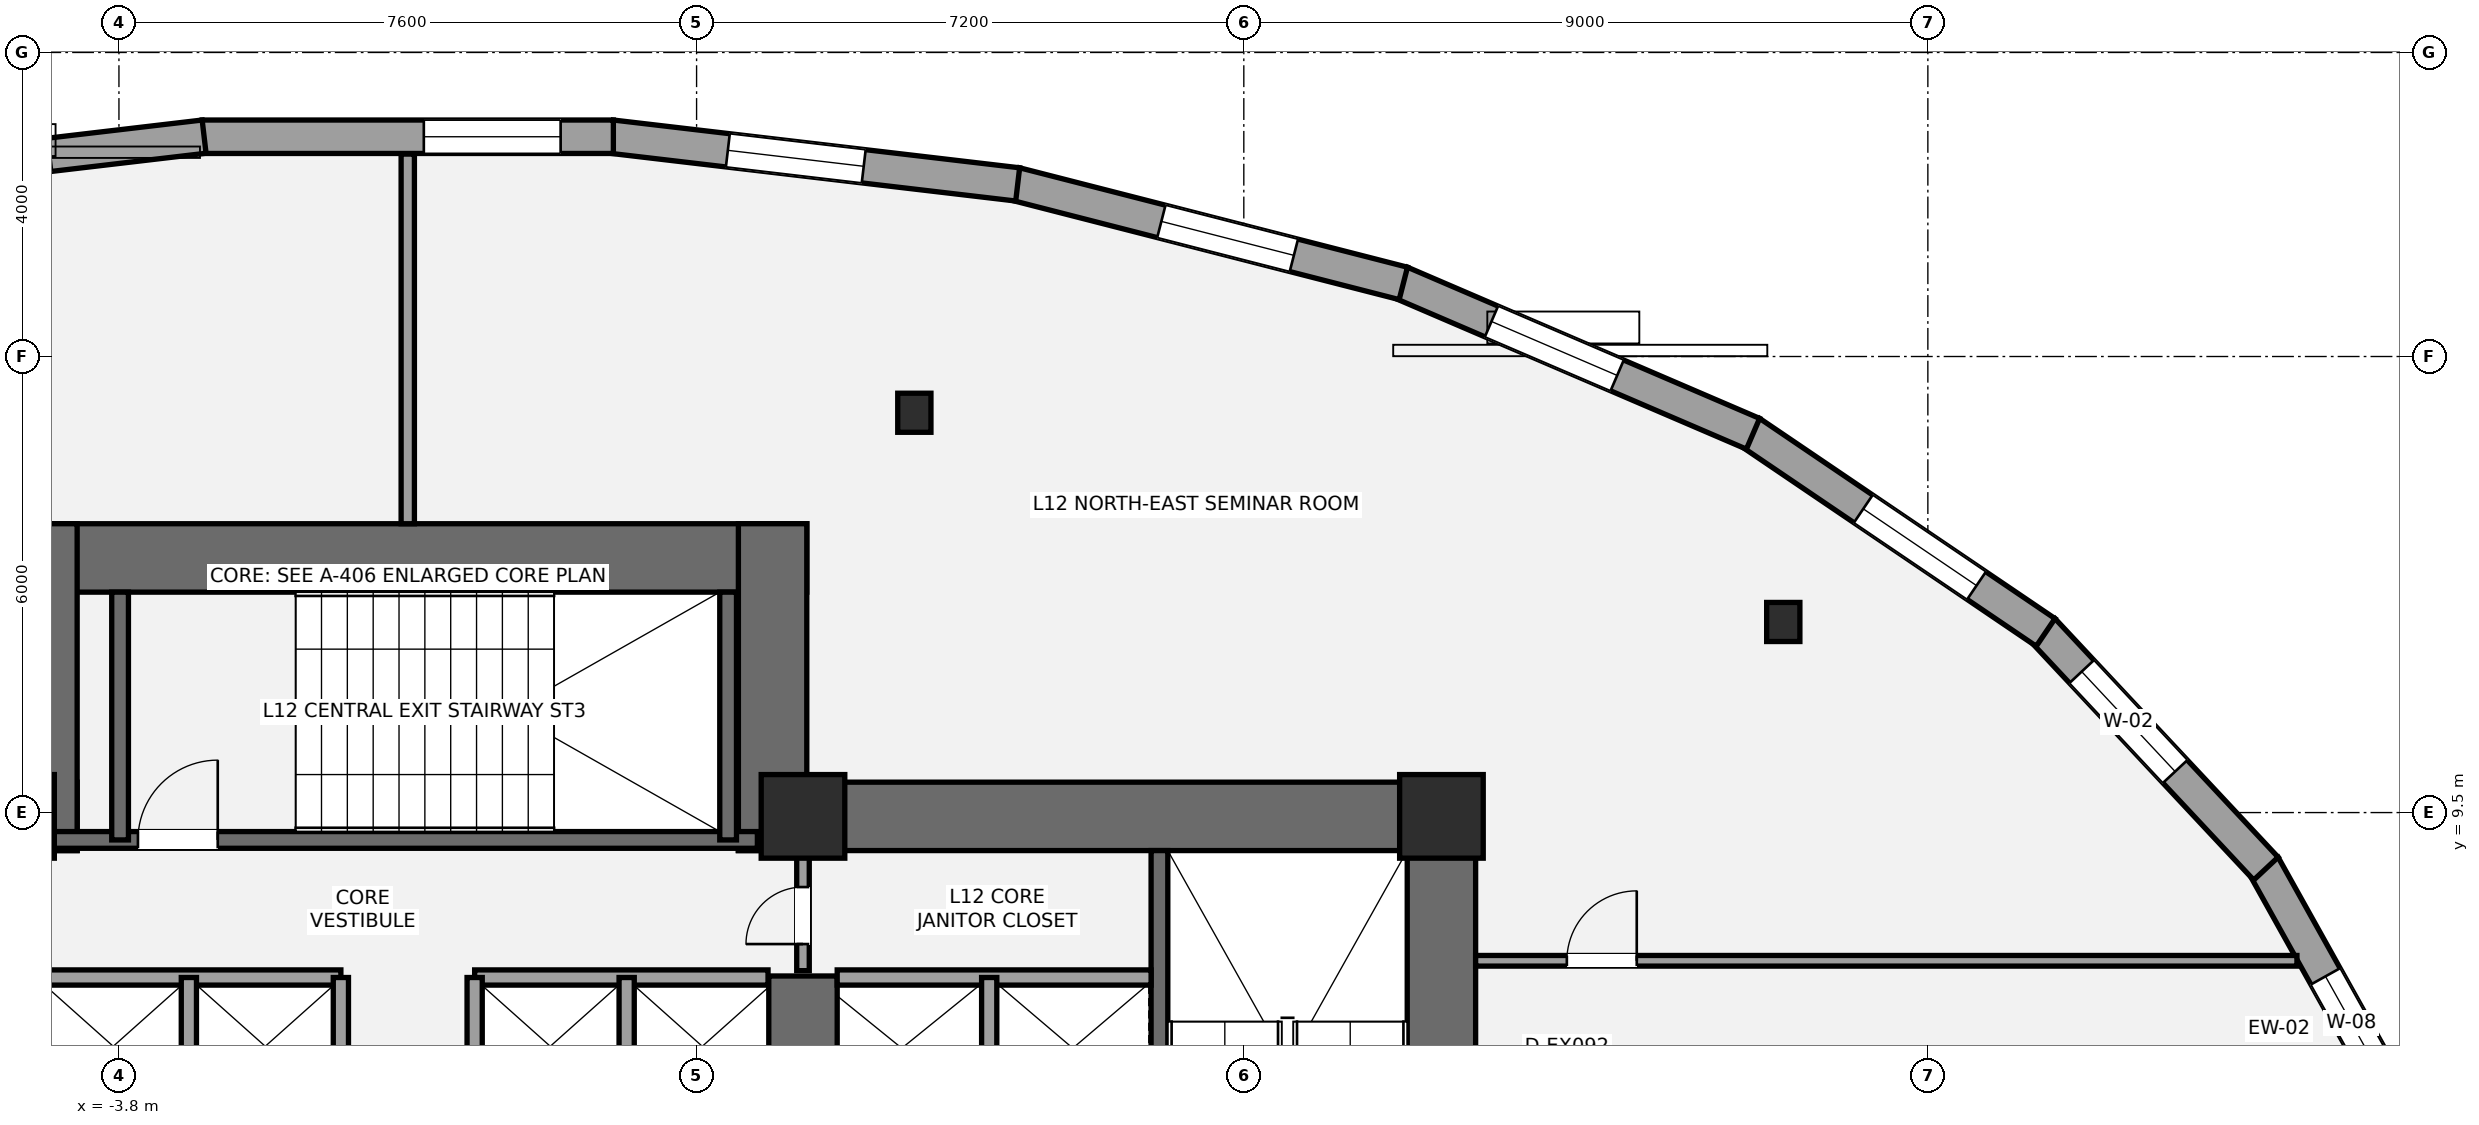
"""IFC4 building model, lengths in metres.
Left out: names, types, materials, properties, quantities, classifications, styles, units other than length and angle.
Written with IfcOpenShell. Run it as: python <this file> out.ifc"""

import sys

from ifc_helpers import new_model, si_unit, direction, frame, frame_2d, origin, origin_2d, place, context, subcontext, project, spatial, rectangle, i_section, extrude, element, fill, save


model = new_model("IFC4")
c1 = context("Model", 3, precision=1e-05, world=origin(), true_north=direction((0.0, 1.0)))
c2 = subcontext(c1, "Body", "Model", "MODEL_VIEW")
j1 = project(units=[si_unit("LENGTHUNIT", "METRE"), si_unit("PLANEANGLEUNIT", "RADIAN")], contexts=[c1])
p1 = place(None, origin())
s1 = spatial("IfcSite", under=j1, at=p1, CompositionType="ELEMENT")
p2 = place(p1, origin())
s2 = spatial("IfcBuilding", under=s1, at=p2, CompositionType="ELEMENT")
p3 = place(p2, frame((0.0, 0.0, 48.6)))
s3 = spatial("IfcBuildingStorey", under=s2, at=p3, CompositionType="ELEMENT", Elevation=48.6)
p4 = place(p3, frame((-14.05, 9.45, 0.0), z_axis=(0.0, 0.0, 1.0), x_axis=(1.0, 0.0, 0.0)))
e1 = element("IfcWall", 1, at=p4, inside=s3, PredefinedType="SHEAR", context=c2, shape_type="SweptSolid", body=[
    extrude(rectangle(XDim=9.7, YDim=0.9, at=frame_2d((4.85, 0.0))), origin(), (0.0, 0.0, 1.0), 3.6),
])
p5 = place(p3, frame((13.6, 0.95, 0.0), z_axis=(0.0, 0.0, 1.0), x_axis=(0.0, 1.0, 0.0)))
e2 = element("IfcWall", 2, at=p5, inside=s3, PredefinedType="SHEAR", context=c2, shape_type="SweptSolid", body=[
    extrude(rectangle(XDim=8.95, YDim=0.9, at=frame_2d((4.475, 0.0))), origin(), (0.0, 0.0, 1.0), 3.6),
])
p6 = place(p3, frame((4.35, 9.45, 0.0), z_axis=(0.0, 0.0, 1.0), x_axis=(1.0, 0.0, 0.0)))
e3 = element("IfcWall", 3, at=p6, inside=s3, PredefinedType="SHEAR", context=c2, shape_type="SweptSolid", body=[
    extrude(rectangle(XDim=9.7, YDim=0.9, at=frame_2d((4.85, 0.0))), origin(), (0.0, 0.0, 1.0), 3.6),
])
p7 = place(p3, frame((5.2, 5.35, 0.0), z_axis=(0.0, 0.0, 1.0), x_axis=(0.0, 1.0, 0.0)))
e4 = element("IfcWall", 4, at=p7, inside=s3, PredefinedType="SHEAR", context=c2, shape_type="SweptSolid", body=[
    extrude(rectangle(XDim=2.0, YDim=0.9, at=frame_2d((1.0, 0.0))), origin(), (0.0, 0.0, 1.0), 3.6),
])
p8 = place(p3, frame((9.89, 1.85, 0.0), z_axis=(0.0, 0.0, 1.0), x_axis=(0.0, 1.0, 0.0)))
e5 = element("IfcWall", 5, at=p8, inside=s3, PredefinedType="SHEAR", context=c2, shape_type="SweptSolid", body=[
    extrude(rectangle(XDim=7.15, YDim=0.22, at=frame_2d((3.575, 0.0))), origin(), (0.0, 0.0, 1.0), 3.6),
])
p9 = place(p3, frame((-5.25, 12.85, 0.0), z_axis=(0.0, 0.0, 1.0), x_axis=(1.0, 0.0, 0.0)))
e6 = element("IfcWall", 6, at=p9, inside=s3, PredefinedType="SHEAR", context=c2, shape_type="SweptSolid", body=[
    extrude(rectangle(XDim=10.5, YDim=0.9, at=frame_2d((5.25, 0.0))), origin(), (0.0, 0.0, 1.0), 3.6),
])
for number, where, z_axis, x_axis in (
    (7, (-4.8, 9.0, 0.0), (0.0, 0.0, 1.0), (0.0, 1.0, 0.0)),
    (8, (4.8, 9.0, 0.0), (0.0, 0.0, 1.0), (0.0, 1.0, 0.0)),
):
    element("IfcWall", number, at=place(p3, frame(where, z_axis=z_axis, x_axis=x_axis)), inside=s3, PredefinedType="SHEAR", context=c2, shape_type="SweptSolid", body=[
        extrude(rectangle(XDim=4.3, YDim=0.9, at=frame_2d((2.15, 0.0))), origin(), (0.0, 0.0, 1.0), 3.6),
    ])
p10 = place(p3, frame((-4.7, 9.14, 0.0), z_axis=(0.0, 0.0, 1.0), x_axis=(1.0, 0.0, 0.0)))
e9 = element("IfcWall", 9, at=p10, inside=s3, PredefinedType="SHEAR", context=c2, shape_type="SweptSolid", body=[
    extrude(rectangle(XDim=9.3, YDim=0.22, at=frame_2d((4.65, 0.0))), origin(), (0.0, 0.0, 1.0), 3.6),
])
p11 = place(p10, frame((1.15, 0.0, 0.0)))
e10 = element("IfcOpeningElement", 10, at=p11, cuts=e9, PredefinedType="OPENING", context=c2, shape_type="SweptSolid", body=[
    extrude(rectangle(XDim=1.05, YDim=2.15, at=frame_2d((0.525, 1.075))), frame((0.0, 0.12, 0.0), z_axis=(0.0, -1.0, 0.0), x_axis=(1.0, 0.0, 0.0)), (0.0, 0.0, 1.0), 0.24),
])
for number, where, z_axis, x_axis in (
    (11, (-3.785, 9.14, 0.0), (0.0, 0.0, 1.0), (0.0, 1.0, 0.0)),
    (12, (4.215, 9.14, 0.0), (0.0, 0.0, 1.0), (0.0, 1.0, 0.0)),
):
    element("IfcWall", number, at=place(p3, frame(where, z_axis=z_axis, x_axis=x_axis)), inside=s3, PredefinedType="SHEAR", context=c2, shape_type="SweptSolid", body=[
        extrude(rectangle(XDim=3.26, YDim=0.22, at=frame_2d((1.63, 0.0))), origin(), (0.0, 0.0, 1.0), 3.6),
    ])
for number, where, z_axis, x_axis in (
    (13, (-5.2, 9.45, 0.0), (0.0, 0.0, 1.0), (1.0, 0.0, 0.0)),
    (14, (5.2, 9.45, 0.0), (0.0, 0.0, 1.0), (1.0, 0.0, 0.0)),
    (15, (13.6, 9.45, 0.0), (0.0, 0.0, 1.0), (1.0, 0.0, 0.0)),
):
    element("IfcColumn", number, at=place(p3, frame(where, z_axis=z_axis, x_axis=x_axis)), inside=s3, PredefinedType="COLUMN", context=c2, shape_type="SweptSolid", body=[
        extrude(rectangle(XDim=1.1, YDim=1.1, at=origin_2d()), origin(), (0.0, 0.0, 1.0), 3.6),
    ])
for number, where, z_axis, x_axis in (
    (16, (18.098, 12.007, 0.0), (0.0, 0.0, 1.0), (1.0, 0.0, 0.0)),
    (17, (6.665, 14.76, 0.0), (0.0, 0.0, 1.0), (1.0, 0.0, 0.0)),
):
    element("IfcColumn", number, at=place(p3, frame(where, z_axis=z_axis, x_axis=x_axis)), inside=s3, PredefinedType="COLUMN", context=c2, shape_type="SweptSolid", body=[
        extrude(i_section(OverallWidth=0.437, OverallDepth=0.514, WebThickness=0.061, FlangeThickness=0.097, at=origin_2d()), origin(), (0.0, 0.0, 1.0), 3.6),
    ])
p12 = place(p3, frame((24.416, 8.806, 0.0), z_axis=(0.0, 0.0, 1.0), x_axis=(0.487369438963, -0.873195871477, 0.0)))
e18 = element("IfcWall", 18, at=p12, inside=s3, PredefinedType="STANDARD", context=c2, shape_type="SweptSolid", body=[
    extrude(rectangle(XDim=3.96, YDim=0.44, at=frame_2d((1.98, 0.0))), origin(), (0.0, 0.0, 1.0), 2.529),
])
p13 = place(p12, frame((1.673, 0.0, 0.58)))
e19 = element("IfcOpeningElement", 19, at=p13, cuts=e18, PredefinedType="OPENING", context=c2, shape_type="SweptSolid", body=[
    extrude(rectangle(XDim=1.4, YDim=1.55, at=frame_2d((0.7, 0.775))), frame((0.0, 0.23, 0.0), z_axis=(0.0, -1.0, 0.0), x_axis=(1.0, 0.0, 0.0)), (0.0, 0.0, 1.0), 0.46),
])
p14 = place(p3, frame((21.512, 11.902, 0.0), z_axis=(0.0, 0.0, 1.0), x_axis=(0.68299392258, -0.730424056093, 0.0)))
e20 = element("IfcWall", 20, at=p14, inside=s3, PredefinedType="STANDARD", context=c2, shape_type="SweptSolid", body=[
    extrude(rectangle(XDim=4.298, YDim=0.44, at=frame_2d((2.149, 0.0))), origin(), (0.0, 0.0, 1.0), 2.529),
])
p15 = place(p14, frame((0.75, 0.0, 0.65)))
e21 = element("IfcOpeningElement", 21, at=p15, cuts=e20, PredefinedType="OPENING", context=c2, shape_type="SweptSolid", body=[
    extrude(rectangle(XDim=1.8, YDim=1.7, at=frame_2d((0.9, 0.85))), frame((0.0, 0.23, 0.0), z_axis=(0.0, -1.0, 0.0), x_axis=(1.0, 0.0, 0.0)), (0.0, 0.0, 1.0), 0.46),
])
p16 = place(p3, frame((17.663, 14.504, 0.0), z_axis=(0.0, 0.0, 1.0), x_axis=(0.827825981515, -0.560984976919, 0.0)))
e22 = element("IfcWall", 22, at=p16, inside=s3, PredefinedType="STANDARD", context=c2, shape_type="SweptSolid", body=[
    extrude(rectangle(XDim=4.695, YDim=0.44, at=frame_2d((2.347, 0.0))), origin(), (0.0, 0.0, 1.0), 2.529),
])
p17 = place(p16, frame((1.796, 0.0, 0.65)))
e23 = element("IfcOpeningElement", 23, at=p17, cuts=e22, PredefinedType="OPENING", context=c2, shape_type="SweptSolid", body=[
    extrude(rectangle(XDim=1.8, YDim=1.7, at=frame_2d((0.9, 0.85))), frame((0.0, 0.23, 0.0), z_axis=(0.0, -1.0, 0.0), x_axis=(1.0, 0.0, 0.0)), (0.0, 0.0, 1.0), 0.46),
])
p18 = place(p3, frame((13.067, 16.473, 0.0), z_axis=(0.0, 0.0, 1.0), x_axis=(0.918881850071, -0.394532819433, 0.0)))
e24 = element("IfcWall", 24, at=p18, inside=s3, PredefinedType="STANDARD", context=c2, shape_type="SweptSolid", body=[
    extrude(rectangle(XDim=5.042, YDim=0.44, at=frame_2d((2.521, 0.0))), origin(), (0.0, 0.0, 1.0), 2.529),
])
p19 = place(p18, frame((1.297, 0.0, 0.65)))
e25 = element("IfcOpeningElement", 25, at=p19, cuts=e24, PredefinedType="OPENING", context=c2, shape_type="SweptSolid", body=[
    extrude(rectangle(XDim=1.8, YDim=1.7, at=frame_2d((0.9, 0.85))), frame((0.0, 0.23, 0.0), z_axis=(0.0, -1.0, 0.0), x_axis=(1.0, 0.0, 0.0)), (0.0, 0.0, 1.0), 0.46),
])
p20 = place(p3, frame((7.996, 17.77, 0.0), z_axis=(0.0, 0.0, 1.0), x_axis=(0.968705592422, -0.248212560542, 0.0)))
e26 = element("IfcWall", 26, at=p20, inside=s3, PredefinedType="STANDARD", context=c2, shape_type="SweptSolid", body=[
    extrude(rectangle(XDim=5.268, YDim=0.44, at=frame_2d((2.634, 0.0))), origin(), (0.0, 0.0, 1.0), 2.529),
])
p21 = place(p20, frame((1.981, 0.0, 0.65)))
e27 = element("IfcOpeningElement", 27, at=p21, cuts=e26, PredefinedType="OPENING", context=c2, shape_type="SweptSolid", body=[
    extrude(rectangle(XDim=1.8, YDim=1.7, at=frame_2d((0.9, 0.85))), frame((0.0, 0.23, 0.0), z_axis=(0.0, -1.0, 0.0), x_axis=(1.0, 0.0, 0.0)), (0.0, 0.0, 1.0), 0.46),
])
p22 = place(p3, frame((2.679, 18.393, 0.0), z_axis=(0.0, 0.0, 1.0), x_axis=(0.993159890371, -0.116762289112, 0.0)))
e28 = element("IfcWall", 28, at=p22, inside=s3, PredefinedType="STANDARD", context=c2, shape_type="SweptSolid", body=[
    extrude(rectangle(XDim=5.382, YDim=0.44, at=frame_2d((2.691, 0.0))), origin(), (0.0, 0.0, 1.0), 2.529),
])
p23 = place(p22, frame((1.542, 0.0, 0.65)))
e29 = element("IfcOpeningElement", 29, at=p23, cuts=e28, PredefinedType="OPENING", context=c2, shape_type="SweptSolid", body=[
    extrude(rectangle(XDim=1.8, YDim=1.7, at=frame_2d((0.9, 0.85))), frame((0.0, 0.23, 0.0), z_axis=(0.0, -1.0, 0.0), x_axis=(1.0, 0.0, 0.0)), (0.0, 0.0, 1.0), 0.46),
])
p24 = place(p3, frame((-2.705, 18.391, 0.0), z_axis=(0.0, 0.0, 1.0), x_axis=(1.0, 0.0, 0.0)))
e30 = element("IfcWall", 30, at=p24, inside=s3, PredefinedType="STANDARD", context=c2, shape_type="SweptSolid", body=[
    extrude(rectangle(XDim=5.41, YDim=0.44, at=frame_2d((2.705, 0.0))), origin(), (0.0, 0.0, 1.0), 2.529),
])
p25 = place(p24, frame((2.917, 0.0, 0.65)))
e31 = element("IfcOpeningElement", 31, at=p25, cuts=e30, PredefinedType="OPENING", context=c2, shape_type="SweptSolid", body=[
    extrude(rectangle(XDim=1.8, YDim=1.7, at=frame_2d((0.9, 0.85))), frame((0.0, 0.23, 0.0), z_axis=(0.0, -1.0, 0.0), x_axis=(1.0, 0.0, 0.0)), (0.0, 0.0, 1.0), 0.46),
])
p26 = place(p3, frame((-8.025, 17.764, 0.0), z_axis=(0.0, 0.0, 1.0), x_axis=(0.993159890371, 0.116762289112, 0.0)))
e32 = element("IfcWall", 32, at=p26, inside=s3, PredefinedType="STANDARD", context=c2, shape_type="SweptSolid", body=[
    extrude(rectangle(XDim=5.382, YDim=0.44, at=frame_2d((2.691, 0.0))), origin(), (0.0, 0.0, 1.0), 2.529),
])
p27 = place(p26, frame((1.542, 0.0, 0.65)))
e33 = element("IfcOpeningElement", 33, at=p27, cuts=e32, PredefinedType="OPENING", context=c2, shape_type="SweptSolid", body=[
    extrude(rectangle(XDim=1.8, YDim=1.7, at=frame_2d((0.9, 0.85))), frame((0.0, 0.23, 0.0), z_axis=(0.0, -1.0, 0.0), x_axis=(1.0, 0.0, 0.0)), (0.0, 0.0, 1.0), 0.46),
])
p28 = place(p3, frame((5.65, 7.33, 0.0), z_axis=(0.0, 0.0, 1.0), x_axis=(1.0, 0.0, 0.0)))
e34 = element("IfcWall", 34, at=p28, inside=s3, PredefinedType="SOLIDWALL", context=c2, shape_type="SweptSolid", body=[
    extrude(rectangle(XDim=4.13, YDim=0.2, at=frame_2d((2.065, 0.0))), origin(), (0.0, 0.0, 1.0), 3.4),
])
p29 = place(p3, frame((7.65, 5.47, 0.0), z_axis=(0.0, 0.0, 1.0), x_axis=(0.0, 1.0, 0.0)))
e35 = element("IfcWall", 35, at=p29, inside=s3, PredefinedType="SOLIDWALL", context=c2, shape_type="SweptSolid", body=[
    extrude(rectangle(XDim=1.86, YDim=0.2, at=frame_2d((0.93, 0.0))), origin(), (0.0, 0.0, 1.0), 3.4),
])
for number, where, z_axis, x_axis in (
    (36, (-4.74, 7.33, 0.0), (0.0, 0.0, 1.0), (1.0, 0.0, 0.0)),
    (37, (0.88, 7.33, 0.0), (0.0, 0.0, 1.0), (1.0, 0.0, 0.0)),
):
    element("IfcWall", number, at=place(p3, frame(where, z_axis=z_axis, x_axis=x_axis)), inside=s3, PredefinedType="SOLIDWALL", context=c2, shape_type="SweptSolid", body=[
        extrude(rectangle(XDim=3.86, YDim=0.2, at=frame_2d((1.93, 0.0))), origin(), (0.0, 0.0, 1.0), 3.4),
    ])
for number, where, z_axis, x_axis in (
    (38, (-2.88, 5.52, 0.0), (0.0, 0.0, 1.0), (0.0, 1.0, 0.0)),
    (39, (2.88, 5.52, 0.0), (0.0, 0.0, 1.0), (0.0, 1.0, 0.0)),
    (40, (-0.88, 5.52, 0.0), (0.0, 0.0, 1.0), (0.0, 1.0, 0.0)),
    (41, (0.88, 5.52, 0.0), (0.0, 0.0, 1.0), (0.0, 1.0, 0.0)),
):
    element("IfcWall", number, at=place(p3, frame(where, z_axis=z_axis, x_axis=x_axis)), inside=s3, PredefinedType="SOLIDWALL", context=c2, shape_type="SweptSolid", body=[
        extrude(rectangle(XDim=1.81, YDim=0.2, at=frame_2d((0.905, 0.0))), origin(), (0.0, 0.0, 1.0), 3.4),
    ])
p30 = place(p3, frame((5.2, 7.42, 0.0), z_axis=(0.0, 0.0, 1.0), x_axis=(0.0, 1.0, 0.0)))
e42 = element("IfcWall", 42, at=p30, inside=s3, PredefinedType="PARTITIONING", context=c2, shape_type="SweptSolid", body=[
    extrude(rectangle(XDim=1.58, YDim=0.165, at=frame_2d((0.79, 0.0))), origin(), (0.0, 0.0, 1.0), 3.4),
])
p31 = place(p30, frame((0.35, 0.0, 0.0)))
e43 = element("IfcOpeningElement", 43, at=p31, cuts=e42, PredefinedType="OPENING", context=c2, shape_type="SweptSolid", body=[
    extrude(rectangle(XDim=0.75, YDim=2.1, at=frame_2d((0.375, 1.05))), frame((0.0, 0.093, 0.0), z_axis=(0.0, -1.0, 0.0), x_axis=(1.0, 0.0, 0.0)), (0.0, 0.0, 1.0), 0.185),
])
p32 = place(p3, frame((14.05, 7.55, 0.0), z_axis=(0.0, 0.0, 1.0), x_axis=(1.0, 0.0, 0.0)))
e44 = element("IfcWall", 44, at=p32, inside=s3, PredefinedType="PARTITIONING", context=c2, shape_type="SweptSolid", body=[
    extrude(rectangle(XDim=10.806, YDim=0.14, at=frame_2d((5.403, 0.0))), origin(), (0.0, 0.0, 1.0), 2.853),
])
p33 = place(p32, frame((1.2, 0.0, 0.0)))
e45 = element("IfcOpeningElement", 45, at=p33, cuts=e44, PredefinedType="OPENING", context=c2, shape_type="SweptSolid", body=[
    extrude(rectangle(XDim=0.92, YDim=2.15, at=frame_2d((0.46, 1.075))), frame((0.0, 0.08, 0.0), z_axis=(0.0, -1.0, 0.0), x_axis=(1.0, 0.0, 0.0)), (0.0, 0.0, 1.0), 0.16),
])
p34 = place(p3, frame((0.0, 13.3, 0.0), z_axis=(0.0, 0.0, 1.0), x_axis=(0.0, 1.0, 0.0)))
e46 = element("IfcWall", 46, at=p34, inside=s3, PredefinedType="PARTITIONING", context=c2, shape_type="SweptSolid", body=[
    extrude(rectangle(XDim=4.863, YDim=0.175, at=frame_2d((2.432, 0.0))), origin(), (0.0, 0.0, 1.0), 3.4),
])
p35 = place(p13, origin())
e47 = element("IfcWindow", 47, at=p35, inside=s3, PartitioningType="SINGLE_PANEL", PredefinedType="WINDOW", context=c2, shape_type="SweptSolid", body=[
    extrude(rectangle(XDim=1.4, YDim=1.55, at=frame_2d((0.7, 0.775))), frame((0.0, -0.01, 0.0), z_axis=(0.0, -1.0, 0.0), x_axis=(1.0, 0.0, 0.0)), (0.0, 0.0, 1.0), 0.06),
])
fill(e19, e47)
p36 = place(p15, origin())
e48 = element("IfcWindow", 48, at=p36, inside=s3, PartitioningType="SINGLE_PANEL", PredefinedType="WINDOW", context=c2, shape_type="SweptSolid", body=[
    extrude(rectangle(XDim=1.8, YDim=1.7, at=frame_2d((0.9, 0.85))), frame((0.0, -0.01, 0.0), z_axis=(0.0, -1.0, 0.0), x_axis=(1.0, 0.0, 0.0)), (0.0, 0.0, 1.0), 0.06),
])
fill(e21, e48)
p37 = place(p17, origin())
e49 = element("IfcWindow", 49, at=p37, inside=s3, PartitioningType="SINGLE_PANEL", PredefinedType="WINDOW", context=c2, shape_type="SweptSolid", body=[
    extrude(rectangle(XDim=1.8, YDim=1.7, at=frame_2d((0.9, 0.85))), frame((0.0, -0.01, 0.0), z_axis=(0.0, -1.0, 0.0), x_axis=(1.0, 0.0, 0.0)), (0.0, 0.0, 1.0), 0.06),
])
fill(e23, e49)
p38 = place(p19, origin())
e50 = element("IfcWindow", 50, at=p38, inside=s3, PartitioningType="SINGLE_PANEL", PredefinedType="WINDOW", context=c2, shape_type="SweptSolid", body=[
    extrude(rectangle(XDim=1.8, YDim=1.7, at=frame_2d((0.9, 0.85))), frame((0.0, -0.01, 0.0), z_axis=(0.0, -1.0, 0.0), x_axis=(1.0, 0.0, 0.0)), (0.0, 0.0, 1.0), 0.06),
])
fill(e25, e50)
p39 = place(p21, origin())
e51 = element("IfcWindow", 51, at=p39, inside=s3, PartitioningType="SINGLE_PANEL", PredefinedType="WINDOW", context=c2, shape_type="SweptSolid", body=[
    extrude(rectangle(XDim=1.8, YDim=1.7, at=frame_2d((0.9, 0.85))), frame((0.0, -0.01, 0.0), z_axis=(0.0, -1.0, 0.0), x_axis=(1.0, 0.0, 0.0)), (0.0, 0.0, 1.0), 0.06),
])
fill(e27, e51)
p40 = place(p23, origin())
e52 = element("IfcWindow", 52, at=p40, inside=s3, PartitioningType="SINGLE_PANEL", PredefinedType="WINDOW", context=c2, shape_type="SweptSolid", body=[
    extrude(rectangle(XDim=1.8, YDim=1.7, at=frame_2d((0.9, 0.85))), frame((0.0, -0.01, 0.0), z_axis=(0.0, -1.0, 0.0), x_axis=(1.0, 0.0, 0.0)), (0.0, 0.0, 1.0), 0.06),
])
fill(e29, e52)
p41 = place(p25, origin())
e53 = element("IfcWindow", 53, at=p41, inside=s3, PartitioningType="SINGLE_PANEL", PredefinedType="WINDOW", context=c2, shape_type="SweptSolid", body=[
    extrude(rectangle(XDim=1.8, YDim=1.7, at=frame_2d((0.9, 0.85))), frame((0.0, -0.01, 0.0), z_axis=(0.0, -1.0, 0.0), x_axis=(1.0, 0.0, 0.0)), (0.0, 0.0, 1.0), 0.06),
])
fill(e31, e53)
p42 = place(p11, origin())
e54 = element("IfcDoor", 54, at=p42, inside=s3, OperationType="SINGLE_SWING_RIGHT", PredefinedType="DOOR", context=c2, shape_type="SweptSolid", body=[
    extrude(rectangle(XDim=1.05, YDim=2.15, at=frame_2d((0.525, 1.075))), frame((0.0, 0.025, 0.0), z_axis=(0.0, -1.0, 0.0), x_axis=(1.0, 0.0, 0.0)), (0.0, 0.0, 1.0), 0.05),
])
fill(e10, e54)
p43 = place(p31, origin())
e55 = element("IfcDoor", 55, at=p43, inside=s3, OperationType="SINGLE_SWING_LEFT", PredefinedType="DOOR", context=c2, shape_type="SweptSolid", body=[
    extrude(rectangle(XDim=0.75, YDim=2.1, at=frame_2d((0.375, 1.05))), frame((0.0, 0.025, 0.0), z_axis=(0.0, -1.0, 0.0), x_axis=(1.0, 0.0, 0.0)), (0.0, 0.0, 1.0), 0.05),
])
fill(e43, e55)
p44 = place(p33, origin())
e56 = element("IfcDoor", 56, at=p44, inside=s3, OperationType="SINGLE_SWING_RIGHT", PredefinedType="DOOR", context=c2, shape_type="SweptSolid", body=[
    extrude(rectangle(XDim=0.92, YDim=2.15, at=frame_2d((0.46, 1.075))), frame((0.0, 0.025, 0.0), z_axis=(0.0, -1.0, 0.0), x_axis=(1.0, 0.0, 0.0)), (0.0, 0.0, 1.0), 0.05),
])
fill(e45, e56)
save(model, sys.argv[1])
